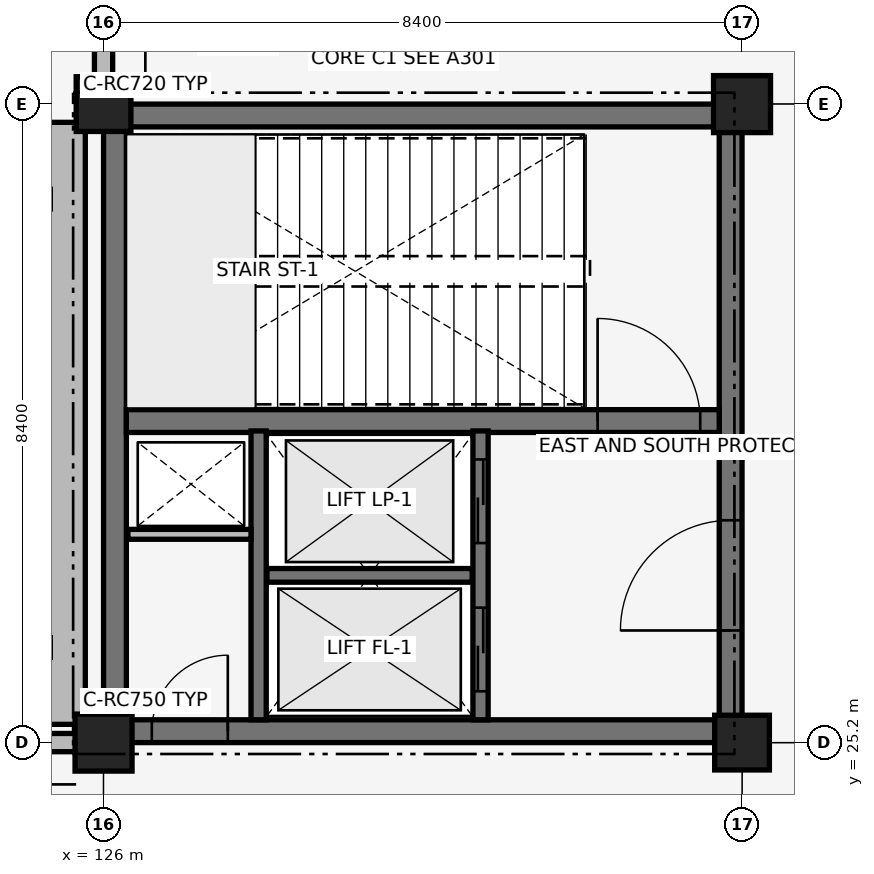
"""IFC4 building model, lengths in metres.
Left out: names, types, materials, properties, quantities, classifications, styles, units other than length and angle.
Written with IfcOpenShell. Run it as: python <this file> out.ifc"""

import sys

from ifc_helpers import new_model, si_unit, direction, frame, frame_2d, origin, origin_2d, place, context, subcontext, project, spatial, rectangle, extrude, element, fill, save


model = new_model("IFC4")
c1 = context("Model", 3, precision=1e-05, world=origin(), true_north=direction((0.0, 1.0)))
c2 = subcontext(c1, "Body", "Model", "MODEL_VIEW")
j1 = project(units=[si_unit("LENGTHUNIT", "METRE"), si_unit("PLANEANGLEUNIT", "RADIAN")], contexts=[c1])
p1 = place(None, origin())
s1 = spatial("IfcSite", under=j1, at=p1, CompositionType="ELEMENT")
p2 = place(p1, origin())
s2 = spatial("IfcBuilding", under=s1, at=p2, CompositionType="ELEMENT")
p3 = place(p2, origin())
s3 = spatial("IfcBuildingStorey", under=s2, at=p3, CompositionType="ELEMENT", Elevation=0.0)
p4 = place(p3, frame((126.15, 25.35, 0.0), z_axis=(0.0, 0.0, 1.0), x_axis=(1.0, 0.0, 0.0)))
e1 = element("IfcWall", 1, at=p4, inside=s3, PredefinedType="SHEAR", context=c2, shape_type="SweptSolid", body=[
    extrude(rectangle(XDim=8.1, YDim=0.3, at=frame_2d((4.05, 0.0))), origin(), (0.0, 0.0, 1.0), 5.14),
])
p5 = place(p4, frame((0.485, 0.0, 0.0)))
e2 = element("IfcOpeningElement", 2, at=p5, cuts=e1, PredefinedType="OPENING", context=c2, shape_type="SweptSolid", body=[
    extrude(rectangle(XDim=1.0, YDim=2.15, at=frame_2d((0.5, 1.075))), frame((0.0, 0.16, 0.0), z_axis=(0.0, -1.0, 0.0), x_axis=(1.0, 0.0, 0.0)), (0.0, 0.0, 1.0), 0.32),
])
p6 = place(p3, frame((126.15, 33.45, 0.0), z_axis=(0.0, 0.0, 1.0), x_axis=(1.0, 0.0, 0.0)))
e3 = element("IfcWall", 3, at=p6, inside=s3, PredefinedType="SHEAR", context=c2, shape_type="SweptSolid", body=[
    extrude(rectangle(XDim=8.1, YDim=0.3, at=frame_2d((4.05, 0.0))), origin(), (0.0, 0.0, 1.0), 5.14),
])
p7 = place(p3, frame((126.15, 25.35, 0.0), z_axis=(0.0, 0.0, 1.0), x_axis=(0.0, 1.0, 0.0)))
e4 = element("IfcWall", 4, at=p7, inside=s3, PredefinedType="SHEAR", context=c2, shape_type="SweptSolid", body=[
    extrude(rectangle(XDim=8.1, YDim=0.3, at=frame_2d((4.05, 0.0))), origin(), (0.0, 0.0, 1.0), 5.14),
])
p8 = place(p3, frame((134.25, 25.35, 0.0), z_axis=(0.0, 0.0, 1.0), x_axis=(0.0, 1.0, 0.0)))
e5 = element("IfcWall", 5, at=p8, inside=s3, PredefinedType="SHEAR", context=c2, shape_type="SweptSolid", body=[
    extrude(rectangle(XDim=8.1, YDim=0.3, at=frame_2d((4.05, 0.0))), origin(), (0.0, 0.0, 1.0), 5.14),
])
p9 = place(p8, frame((1.325, 0.0, 0.0)))
e6 = element("IfcOpeningElement", 6, at=p9, cuts=e5, PredefinedType="OPENING", context=c2, shape_type="SweptSolid", body=[
    extrude(rectangle(XDim=1.45, YDim=2.15, at=frame_2d((0.725, 1.075))), frame((0.0, 0.16, 0.0), z_axis=(0.0, -1.0, 0.0), x_axis=(1.0, 0.0, 0.0)), (0.0, 0.0, 1.0), 0.32),
])
p10 = place(p3, frame((126.3, 29.43, 0.0), z_axis=(0.0, 0.0, 1.0), x_axis=(1.0, 0.0, 0.0)))
e7 = element("IfcWall", 7, at=p10, inside=s3, PredefinedType="SHEAR", context=c2, shape_type="SweptSolid", body=[
    extrude(rectangle(XDim=7.8, YDim=0.3, at=frame_2d((3.9, 0.0))), origin(), (0.0, 0.0, 1.0), 5.14),
])
p11 = place(p10, frame((6.2, 0.0, 0.0)))
e8 = element("IfcOpeningElement", 8, at=p11, cuts=e7, PredefinedType="OPENING", context=c2, shape_type="SweptSolid", body=[
    extrude(rectangle(XDim=1.35, YDim=2.15, at=frame_2d((0.675, 1.075))), frame((0.0, 0.16, 0.0), z_axis=(0.0, -1.0, 0.0), x_axis=(1.0, 0.0, 0.0)), (0.0, 0.0, 1.0), 0.32),
])
p12 = place(p3, frame((126.0, 25.2, 0.0), z_axis=(0.0, 0.0, 1.0), x_axis=(1.0, 0.0, 0.0)))
e9 = element("IfcColumn", 9, at=p12, inside=s3, PredefinedType="COLUMN", context=c2, shape_type="SweptSolid", body=[
    extrude(rectangle(XDim=0.75, YDim=0.75, at=origin_2d()), origin(), (0.0, 0.0, 1.0), 5.14),
])
for number, where, z_axis, x_axis in (
    (10, (126.0, 33.6, 0.0), (0.0, 0.0, 1.0), (1.0, 0.0, 0.0)),
    (11, (134.4, 25.2, 0.0), (0.0, 0.0, 1.0), (1.0, 0.0, 0.0)),
):
    element("IfcColumn", number, at=place(p3, frame(where, z_axis=z_axis, x_axis=x_axis)), inside=s3, PredefinedType="COLUMN", context=c2, shape_type="SweptSolid", body=[
        extrude(rectangle(XDim=0.72, YDim=0.72, at=origin_2d()), origin(), (0.0, 0.0, 1.0), 5.14),
    ])
p13 = place(p3, frame((134.4, 33.6, 0.0), z_axis=(0.0, 0.0, 1.0), x_axis=(1.0, 0.0, 0.0)))
e12 = element("IfcColumn", 12, at=p13, inside=s3, PredefinedType="COLUMN", context=c2, shape_type="SweptSolid", body=[
    extrude(rectangle(XDim=0.75, YDim=0.75, at=origin_2d()), origin(), (0.0, 0.0, 1.0), 5.14),
])
p14 = place(p3, frame((117.875, 25.2, 0.0), z_axis=(0.0, 0.0, 1.0), x_axis=(1.0, 0.0, 0.0)))
e13 = element("IfcWall", 13, at=p14, inside=s3, PredefinedType="SOLIDWALL", context=c2, shape_type="SweptSolid", body=[
    extrude(rectangle(XDim=7.765, YDim=0.24, at=frame_2d((3.882, 0.0))), origin(), (0.0, 0.0, 1.0), 4.39),
])
p15 = place(p14, frame((0.796, 0.0, 0.35)))
e14 = element("IfcOpeningElement", 14, at=p15, cuts=e13, PredefinedType="OPENING", context=c2, shape_type="SweptSolid", body=[
    extrude(rectangle(XDim=0.44, YDim=1.25, at=frame_2d((0.22, 0.625))), frame((0.0, 0.13, 0.0), z_axis=(0.0, -1.0, 0.0), x_axis=(1.0, 0.0, 0.0)), (0.0, 0.0, 1.0), 0.26),
])
p16 = place(p14, frame((2.229, 0.0, 0.35)))
e15 = element("IfcOpeningElement", 15, at=p16, cuts=e13, PredefinedType="OPENING", context=c2, shape_type="SweptSolid", body=[
    extrude(rectangle(XDim=0.44, YDim=1.25, at=frame_2d((0.22, 0.625))), frame((0.0, 0.13, 0.0), z_axis=(0.0, -1.0, 0.0), x_axis=(1.0, 0.0, 0.0)), (0.0, 0.0, 1.0), 0.26),
])
p17 = place(p14, frame((3.663, 0.0, 0.35)))
e16 = element("IfcOpeningElement", 16, at=p17, cuts=e13, PredefinedType="OPENING", context=c2, shape_type="SweptSolid", body=[
    extrude(rectangle(XDim=0.44, YDim=1.25, at=frame_2d((0.22, 0.625))), frame((0.0, 0.13, 0.0), z_axis=(0.0, -1.0, 0.0), x_axis=(1.0, 0.0, 0.0)), (0.0, 0.0, 1.0), 0.26),
])
p18 = place(p14, frame((5.095, 0.0, 0.35)))
e17 = element("IfcOpeningElement", 17, at=p18, cuts=e13, PredefinedType="OPENING", context=c2, shape_type="SweptSolid", body=[
    extrude(rectangle(XDim=0.44, YDim=1.25, at=frame_2d((0.22, 0.625))), frame((0.0, 0.13, 0.0), z_axis=(0.0, -1.0, 0.0), x_axis=(1.0, 0.0, 0.0)), (0.0, 0.0, 1.0), 0.26),
])
p19 = place(p14, frame((6.529, 0.0, 0.35)))
e18 = element("IfcOpeningElement", 18, at=p19, cuts=e13, PredefinedType="OPENING", context=c2, shape_type="SweptSolid", body=[
    extrude(rectangle(XDim=0.44, YDim=1.25, at=frame_2d((0.22, 0.625))), frame((0.0, 0.13, 0.0), z_axis=(0.0, -1.0, 0.0), x_axis=(1.0, 0.0, 0.0)), (0.0, 0.0, 1.0), 0.26),
])
p20 = place(p14, frame((0.796, 0.0, 1.8)))
e19 = element("IfcOpeningElement", 19, at=p20, cuts=e13, PredefinedType="OPENING", context=c2, shape_type="SweptSolid", body=[
    extrude(rectangle(XDim=0.44, YDim=1.25, at=frame_2d((0.22, 0.625))), frame((0.0, 0.13, 0.0), z_axis=(0.0, -1.0, 0.0), x_axis=(1.0, 0.0, 0.0)), (0.0, 0.0, 1.0), 0.26),
])
p21 = place(p14, frame((2.229, 0.0, 1.8)))
e20 = element("IfcOpeningElement", 20, at=p21, cuts=e13, PredefinedType="OPENING", context=c2, shape_type="SweptSolid", body=[
    extrude(rectangle(XDim=0.44, YDim=1.25, at=frame_2d((0.22, 0.625))), frame((0.0, 0.13, 0.0), z_axis=(0.0, -1.0, 0.0), x_axis=(1.0, 0.0, 0.0)), (0.0, 0.0, 1.0), 0.26),
])
p22 = place(p14, frame((3.663, 0.0, 1.8)))
e21 = element("IfcOpeningElement", 21, at=p22, cuts=e13, PredefinedType="OPENING", context=c2, shape_type="SweptSolid", body=[
    extrude(rectangle(XDim=0.44, YDim=1.25, at=frame_2d((0.22, 0.625))), frame((0.0, 0.13, 0.0), z_axis=(0.0, -1.0, 0.0), x_axis=(1.0, 0.0, 0.0)), (0.0, 0.0, 1.0), 0.26),
])
p23 = place(p14, frame((5.095, 0.0, 1.8)))
e22 = element("IfcOpeningElement", 22, at=p23, cuts=e13, PredefinedType="OPENING", context=c2, shape_type="SweptSolid", body=[
    extrude(rectangle(XDim=0.44, YDim=1.25, at=frame_2d((0.22, 0.625))), frame((0.0, 0.13, 0.0), z_axis=(0.0, -1.0, 0.0), x_axis=(1.0, 0.0, 0.0)), (0.0, 0.0, 1.0), 0.26),
])
p24 = place(p14, frame((6.529, 0.0, 1.8)))
e23 = element("IfcOpeningElement", 23, at=p24, cuts=e13, PredefinedType="OPENING", context=c2, shape_type="SweptSolid", body=[
    extrude(rectangle(XDim=0.44, YDim=1.25, at=frame_2d((0.22, 0.625))), frame((0.0, 0.13, 0.0), z_axis=(0.0, -1.0, 0.0), x_axis=(1.0, 0.0, 0.0)), (0.0, 0.0, 1.0), 0.26),
])
p25 = place(p3, frame((125.52, 25.44, -0.25), z_axis=(0.0, 0.0, 1.0), x_axis=(0.0, 1.0, 0.0)))
e24 = element("IfcWall", 24, at=p25, inside=s3, PredefinedType="SOLIDWALL", context=c2, shape_type="SweptSolid", body=[
    extrude(rectangle(XDim=7.92, YDim=0.48, at=frame_2d((3.96, 0.0))), origin(), (0.0, 0.0, 1.0), 5.69),
])
p26 = place(p3, frame((126.0, 33.945, 0.0), z_axis=(0.0, 0.0, 1.0), x_axis=(0.0, 1.0, 0.0)))
e25 = element("IfcWall", 25, at=p26, inside=s3, PredefinedType="SOLIDWALL", context=c2, shape_type="SweptSolid", body=[
    extrude(rectangle(XDim=7.695, YDim=0.24, at=frame_2d((3.847, 0.0))), origin(), (0.0, 0.0, 1.0), 4.39),
])
p27 = place(p26, frame((0.79, 0.0, 0.35)))
e26 = element("IfcOpeningElement", 26, at=p27, cuts=e25, PredefinedType="OPENING", context=c2, shape_type="SweptSolid", body=[
    extrude(rectangle(XDim=0.44, YDim=1.25, at=frame_2d((0.22, 0.625))), frame((0.0, 0.13, 0.0), z_axis=(0.0, -1.0, 0.0), x_axis=(1.0, 0.0, 0.0)), (0.0, 0.0, 1.0), 0.26),
])
p28 = place(p26, frame((2.208, 0.0, 0.35)))
e27 = element("IfcOpeningElement", 27, at=p28, cuts=e25, PredefinedType="OPENING", context=c2, shape_type="SweptSolid", body=[
    extrude(rectangle(XDim=0.44, YDim=1.25, at=frame_2d((0.22, 0.625))), frame((0.0, 0.13, 0.0), z_axis=(0.0, -1.0, 0.0), x_axis=(1.0, 0.0, 0.0)), (0.0, 0.0, 1.0), 0.26),
])
p29 = place(p26, frame((3.627, 0.0, 0.35)))
e28 = element("IfcOpeningElement", 28, at=p29, cuts=e25, PredefinedType="OPENING", context=c2, shape_type="SweptSolid", body=[
    extrude(rectangle(XDim=0.44, YDim=1.25, at=frame_2d((0.22, 0.625))), frame((0.0, 0.13, 0.0), z_axis=(0.0, -1.0, 0.0), x_axis=(1.0, 0.0, 0.0)), (0.0, 0.0, 1.0), 0.26),
])
p30 = place(p26, frame((5.046, 0.0, 0.35)))
e29 = element("IfcOpeningElement", 29, at=p30, cuts=e25, PredefinedType="OPENING", context=c2, shape_type="SweptSolid", body=[
    extrude(rectangle(XDim=0.44, YDim=1.25, at=frame_2d((0.22, 0.625))), frame((0.0, 0.13, 0.0), z_axis=(0.0, -1.0, 0.0), x_axis=(1.0, 0.0, 0.0)), (0.0, 0.0, 1.0), 0.26),
])
p31 = place(p26, frame((6.466, 0.0, 0.35)))
e30 = element("IfcOpeningElement", 30, at=p31, cuts=e25, PredefinedType="OPENING", context=c2, shape_type="SweptSolid", body=[
    extrude(rectangle(XDim=0.44, YDim=1.25, at=frame_2d((0.22, 0.625))), frame((0.0, 0.13, 0.0), z_axis=(0.0, -1.0, 0.0), x_axis=(1.0, 0.0, 0.0)), (0.0, 0.0, 1.0), 0.26),
])
p32 = place(p26, frame((0.79, 0.0, 1.8)))
e31 = element("IfcOpeningElement", 31, at=p32, cuts=e25, PredefinedType="OPENING", context=c2, shape_type="SweptSolid", body=[
    extrude(rectangle(XDim=0.44, YDim=1.25, at=frame_2d((0.22, 0.625))), frame((0.0, 0.13, 0.0), z_axis=(0.0, -1.0, 0.0), x_axis=(1.0, 0.0, 0.0)), (0.0, 0.0, 1.0), 0.26),
])
p33 = place(p26, frame((2.208, 0.0, 1.8)))
e32 = element("IfcOpeningElement", 32, at=p33, cuts=e25, PredefinedType="OPENING", context=c2, shape_type="SweptSolid", body=[
    extrude(rectangle(XDim=0.44, YDim=1.25, at=frame_2d((0.22, 0.625))), frame((0.0, 0.13, 0.0), z_axis=(0.0, -1.0, 0.0), x_axis=(1.0, 0.0, 0.0)), (0.0, 0.0, 1.0), 0.26),
])
p34 = place(p26, frame((3.627, 0.0, 1.8)))
e33 = element("IfcOpeningElement", 33, at=p34, cuts=e25, PredefinedType="OPENING", context=c2, shape_type="SweptSolid", body=[
    extrude(rectangle(XDim=0.44, YDim=1.25, at=frame_2d((0.22, 0.625))), frame((0.0, 0.13, 0.0), z_axis=(0.0, -1.0, 0.0), x_axis=(1.0, 0.0, 0.0)), (0.0, 0.0, 1.0), 0.26),
])
p35 = place(p26, frame((5.046, 0.0, 1.8)))
e34 = element("IfcOpeningElement", 34, at=p35, cuts=e25, PredefinedType="OPENING", context=c2, shape_type="SweptSolid", body=[
    extrude(rectangle(XDim=0.44, YDim=1.25, at=frame_2d((0.22, 0.625))), frame((0.0, 0.13, 0.0), z_axis=(0.0, -1.0, 0.0), x_axis=(1.0, 0.0, 0.0)), (0.0, 0.0, 1.0), 0.26),
])
p36 = place(p26, frame((6.466, 0.0, 1.8)))
e35 = element("IfcOpeningElement", 35, at=p36, cuts=e25, PredefinedType="OPENING", context=c2, shape_type="SweptSolid", body=[
    extrude(rectangle(XDim=0.44, YDim=1.25, at=frame_2d((0.22, 0.625))), frame((0.0, 0.13, 0.0), z_axis=(0.0, -1.0, 0.0), x_axis=(1.0, 0.0, 0.0)), (0.0, 0.0, 1.0), 0.26),
])
p37 = place(p3, frame((130.96, 25.5, 0.0), z_axis=(0.0, 0.0, 1.0), x_axis=(0.0, 1.0, 0.0)))
e36 = element("IfcWall", 36, at=p37, inside=s3, PredefinedType="SHEAR", context=c2, shape_type="SweptSolid", body=[
    extrude(rectangle(XDim=3.8, YDim=0.2, at=frame_2d((1.9, 0.0))), origin(), (0.0, 0.0, 1.0), 4.46),
])
p38 = place(p37, frame((0.375, 0.0, 0.0)))
e37 = element("IfcOpeningElement", 37, at=p38, cuts=e36, PredefinedType="OPENING", context=c2, shape_type="SweptSolid", body=[
    extrude(rectangle(XDim=1.1, YDim=2.15, at=frame_2d((0.55, 1.075))), frame((0.0, 0.11, 0.0), z_axis=(0.0, -1.0, 0.0), x_axis=(1.0, 0.0, 0.0)), (0.0, 0.0, 1.0), 0.22),
])
p39 = place(p37, frame((2.325, 0.0, 0.0)))
e38 = element("IfcOpeningElement", 38, at=p39, cuts=e36, PredefinedType="OPENING", context=c2, shape_type="SweptSolid", body=[
    extrude(rectangle(XDim=1.1, YDim=2.15, at=frame_2d((0.55, 1.075))), frame((0.0, 0.11, 0.0), z_axis=(0.0, -1.0, 0.0), x_axis=(1.0, 0.0, 0.0)), (0.0, 0.0, 1.0), 0.22),
])
p40 = place(p3, frame((128.04, 25.5, 0.0), z_axis=(0.0, 0.0, 1.0), x_axis=(0.0, 1.0, 0.0)))
e39 = element("IfcWall", 39, at=p40, inside=s3, PredefinedType="SHEAR", context=c2, shape_type="SweptSolid", body=[
    extrude(rectangle(XDim=3.8, YDim=0.2, at=frame_2d((1.9, 0.0))), origin(), (0.0, 0.0, 1.0), 4.46),
])
p41 = place(p3, frame((128.15, 27.4, 0.0), z_axis=(0.0, 0.0, 1.0), x_axis=(1.0, 0.0, 0.0)))
e40 = element("IfcWall", 40, at=p41, inside=s3, PredefinedType="SHEAR", context=c2, shape_type="SweptSolid", body=[
    extrude(rectangle(XDim=2.7, YDim=0.18, at=frame_2d((1.35, 0.0))), origin(), (0.0, 0.0, 1.0), 5.14),
])
p42 = place(p3, frame((126.32, 27.94, 0.0), z_axis=(0.0, 0.0, 1.0), x_axis=(1.0, 0.0, 0.0)))
e41 = element("IfcWall", 41, at=p42, inside=s3, PredefinedType="PARTITIONING", context=c2, shape_type="SweptSolid", body=[
    extrude(rectangle(XDim=1.62, YDim=0.13, at=frame_2d((0.81, 0.0))), origin(), (0.0, 0.0, 1.0), 4.39),
])
p43 = place(p11, origin())
e42 = element("IfcDoor", 42, at=p43, inside=s3, OperationType="SINGLE_SWING_LEFT", PredefinedType="DOOR", context=c2, shape_type="SweptSolid", body=[
    extrude(rectangle(XDim=1.35, YDim=2.15, at=frame_2d((0.675, 1.075))), frame((0.0, 0.025, 0.0), z_axis=(0.0, -1.0, 0.0), x_axis=(1.0, 0.0, 0.0)), (0.0, 0.0, 1.0), 0.05),
])
fill(e8, e42)
p44 = place(p38, origin())
e43 = element("IfcDoor", 43, at=p44, inside=s3, OperationType="SLIDING_TO_LEFT", PredefinedType="DOOR", context=c2, shape_type="SweptSolid", body=[
    extrude(rectangle(XDim=1.1, YDim=2.15, at=frame_2d((0.55, 1.075))), frame((0.0, 0.025, 0.0), z_axis=(0.0, -1.0, 0.0), x_axis=(1.0, 0.0, 0.0)), (0.0, 0.0, 1.0), 0.05),
])
fill(e37, e43)
p45 = place(p39, origin())
e44 = element("IfcDoor", 44, at=p45, inside=s3, OperationType="SLIDING_TO_LEFT", PredefinedType="DOOR", context=c2, shape_type="SweptSolid", body=[
    extrude(rectangle(XDim=1.1, YDim=2.15, at=frame_2d((0.55, 1.075))), frame((0.0, 0.025, 0.0), z_axis=(0.0, -1.0, 0.0), x_axis=(1.0, 0.0, 0.0)), (0.0, 0.0, 1.0), 0.05),
])
fill(e38, e44)
p46 = place(p9, origin())
e45 = element("IfcDoor", 45, at=p46, inside=s3, OperationType="DOUBLE_DOOR_SINGLE_SWING", PredefinedType="DOOR", context=c2, shape_type="SweptSolid", body=[
    extrude(rectangle(XDim=1.45, YDim=2.15, at=frame_2d((0.725, 1.075))), frame((0.0, 0.025, 0.0), z_axis=(0.0, -1.0, 0.0), x_axis=(1.0, 0.0, 0.0)), (0.0, 0.0, 1.0), 0.05),
])
fill(e6, e45)
p47 = place(p5, origin())
e46 = element("IfcDoor", 46, at=p47, inside=s3, OperationType="SINGLE_SWING_RIGHT", PredefinedType="DOOR", context=c2, shape_type="SweptSolid", body=[
    extrude(rectangle(XDim=1.0, YDim=2.15, at=frame_2d((0.5, 1.075))), frame((0.0, 0.025, 0.0), z_axis=(0.0, -1.0, 0.0), x_axis=(1.0, 0.0, 0.0)), (0.0, 0.0, 1.0), 0.05),
])
fill(e2, e46)
save(model, sys.argv[1])
